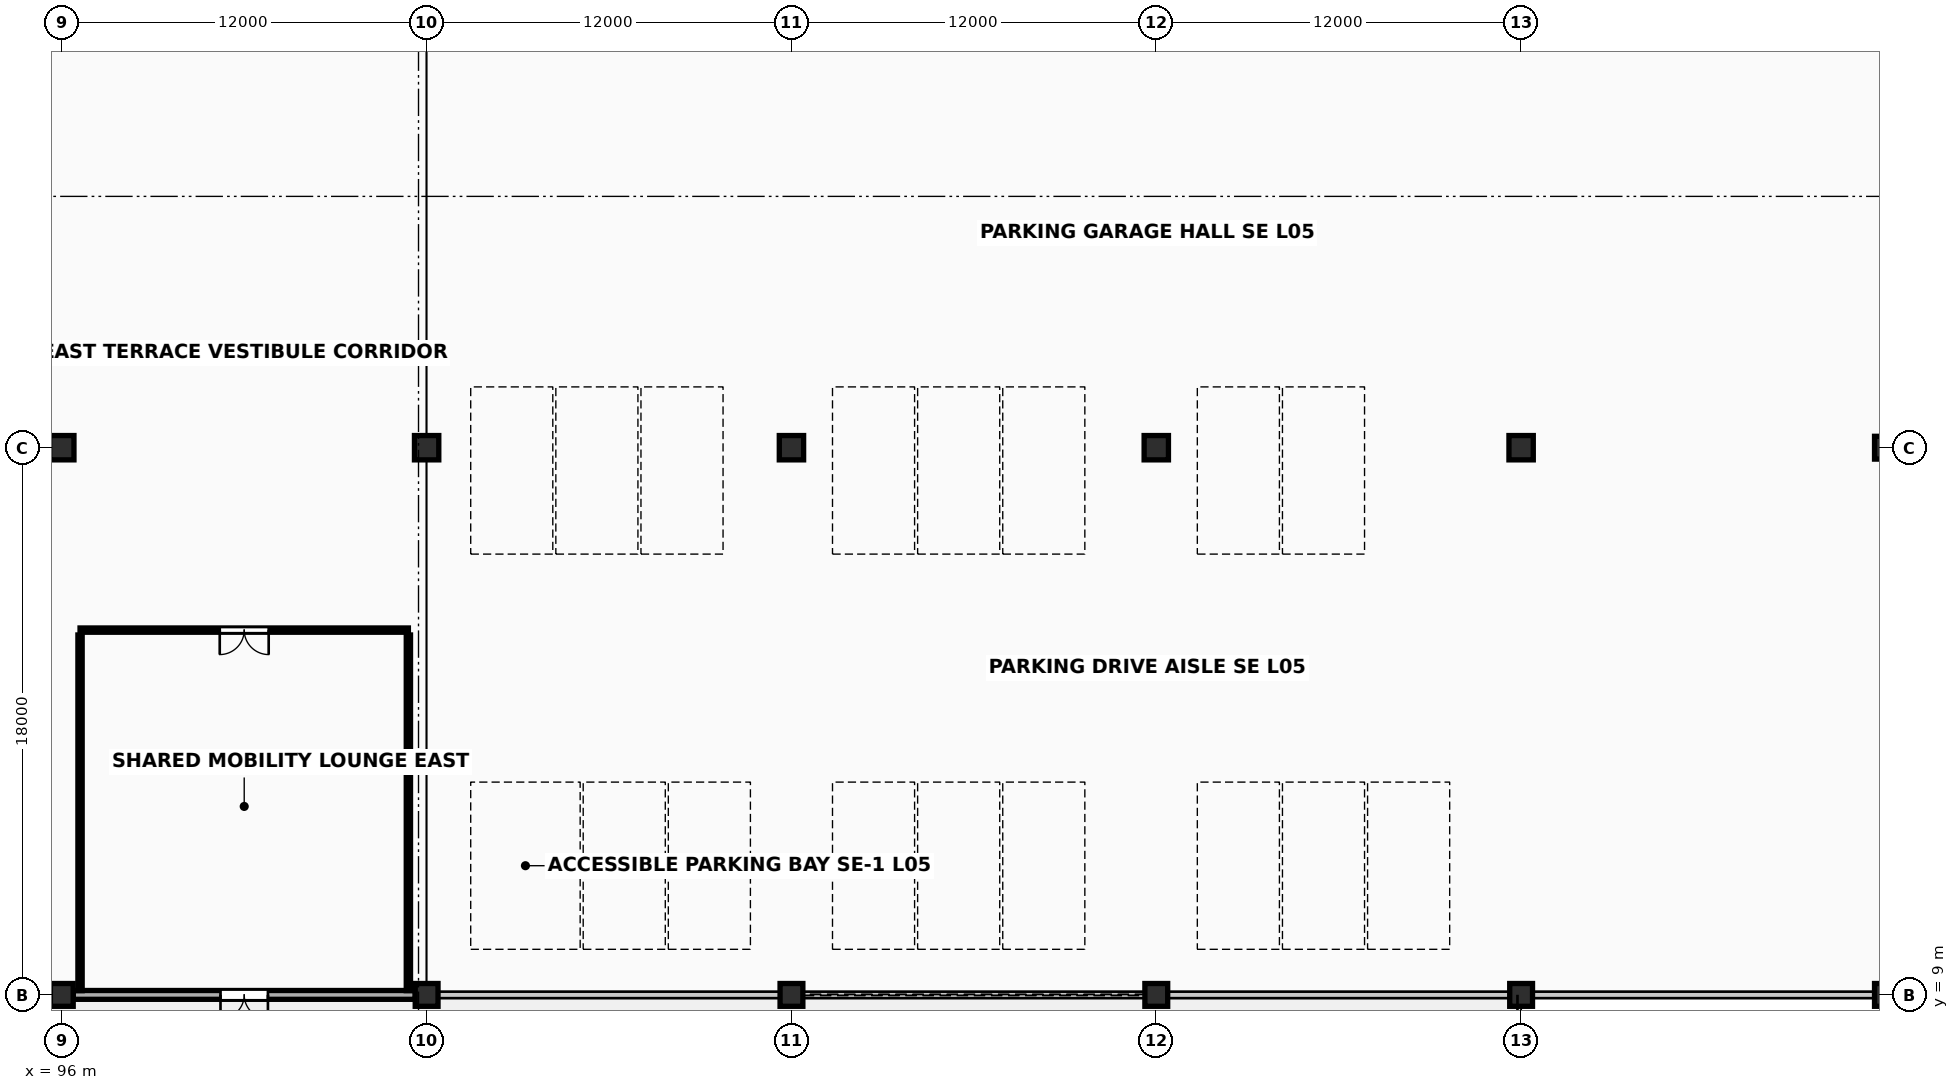
"""IFC4 building model, lengths in metres.
Left out: names, types, materials, properties, quantities, classifications, styles, units other than length and angle.
Written with IfcOpenShell. Run it as: python <this file> out.ifc"""

import sys

from ifc_helpers import new_model, si_unit, direction, frame, frame_2d, origin, origin_2d, place, context, subcontext, project, spatial, rectangle, extrude, element, fill, save


model = new_model("IFC4")
c1 = context("Model", 3, precision=1e-05, world=origin(), true_north=direction((0.0, 1.0)))
c2 = subcontext(c1, "Body", "Model", "MODEL_VIEW")
j1 = project(units=[si_unit("LENGTHUNIT", "METRE"), si_unit("PLANEANGLEUNIT", "RADIAN")], contexts=[c1])
p1 = place(None, origin())
s1 = spatial("IfcSite", under=j1, at=p1, CompositionType="ELEMENT")
p2 = place(p1, origin())
s2 = spatial("IfcBuilding", under=s1, at=p2, CompositionType="ELEMENT")
p3 = place(p2, frame((0.0, 0.0, 21.0)))
s3 = spatial("IfcBuildingStorey", under=s2, at=p3, CompositionType="ELEMENT", Elevation=21.0)
p4 = place(p3, frame((96.0, 9.0, 0.0), z_axis=(0.0, 0.0, 1.0), x_axis=(1.0, 0.0, 0.0)))
e1 = element("IfcColumn", 1, at=p4, inside=s3, PredefinedType="COLUMN", context=c2, shape_type="SweptSolid", body=[
    extrude(rectangle(XDim=0.75, YDim=0.75, at=origin_2d()), origin(), (0.0, 0.0, 1.0), 3.8),
])
p5 = place(p3, frame((96.0, 27.0, 0.0), z_axis=(0.0, 0.0, 1.0), x_axis=(1.0, 0.0, 0.0)))
e2 = element("IfcColumn", 2, at=p5, inside=s3, PredefinedType="COLUMN", context=c2, shape_type="SweptSolid", body=[
    extrude(rectangle(XDim=0.8, YDim=0.8, at=origin_2d()), origin(), (0.0, 0.0, 1.0), 3.8),
])
p6 = place(p3, frame((108.0, 9.0, 0.0), z_axis=(0.0, 0.0, 1.0), x_axis=(1.0, 0.0, 0.0)))
e3 = element("IfcColumn", 3, at=p6, inside=s3, PredefinedType="COLUMN", context=c2, shape_type="SweptSolid", body=[
    extrude(rectangle(XDim=0.75, YDim=0.75, at=origin_2d()), origin(), (0.0, 0.0, 1.0), 3.8),
])
p7 = place(p3, frame((108.0, 27.0, 0.0), z_axis=(0.0, 0.0, 1.0), x_axis=(1.0, 0.0, 0.0)))
e4 = element("IfcColumn", 4, at=p7, inside=s3, PredefinedType="COLUMN", context=c2, shape_type="SweptSolid", body=[
    extrude(rectangle(XDim=0.8, YDim=0.8, at=origin_2d()), origin(), (0.0, 0.0, 1.0), 3.8),
])
p8 = place(p3, frame((120.0, 9.0, 0.0), z_axis=(0.0, 0.0, 1.0), x_axis=(1.0, 0.0, 0.0)))
e5 = element("IfcColumn", 5, at=p8, inside=s3, PredefinedType="COLUMN", context=c2, shape_type="SweptSolid", body=[
    extrude(rectangle(XDim=0.75, YDim=0.75, at=origin_2d()), origin(), (0.0, 0.0, 1.0), 3.8),
])
p9 = place(p3, frame((120.0, 27.0, 0.0), z_axis=(0.0, 0.0, 1.0), x_axis=(1.0, 0.0, 0.0)))
e6 = element("IfcColumn", 6, at=p9, inside=s3, PredefinedType="COLUMN", context=c2, shape_type="SweptSolid", body=[
    extrude(rectangle(XDim=0.8, YDim=0.8, at=origin_2d()), origin(), (0.0, 0.0, 1.0), 3.8),
])
p10 = place(p3, frame((132.0, 9.0, 0.0), z_axis=(0.0, 0.0, 1.0), x_axis=(1.0, 0.0, 0.0)))
e7 = element("IfcColumn", 7, at=p10, inside=s3, PredefinedType="COLUMN", context=c2, shape_type="SweptSolid", body=[
    extrude(rectangle(XDim=0.75, YDim=0.75, at=origin_2d()), origin(), (0.0, 0.0, 1.0), 3.8),
])
p11 = place(p3, frame((132.0, 27.0, 0.0), z_axis=(0.0, 0.0, 1.0), x_axis=(1.0, 0.0, 0.0)))
e8 = element("IfcColumn", 8, at=p11, inside=s3, PredefinedType="COLUMN", context=c2, shape_type="SweptSolid", body=[
    extrude(rectangle(XDim=0.8, YDim=0.8, at=origin_2d()), origin(), (0.0, 0.0, 1.0), 3.8),
])
p12 = place(p3, frame((144.0, 9.0, 0.0), z_axis=(0.0, 0.0, 1.0), x_axis=(1.0, 0.0, 0.0)))
e9 = element("IfcColumn", 9, at=p12, inside=s3, PredefinedType="COLUMN", context=c2, shape_type="SweptSolid", body=[
    extrude(rectangle(XDim=0.75, YDim=0.75, at=origin_2d()), origin(), (0.0, 0.0, 1.0), 3.8),
])
p13 = place(p3, frame((144.0, 27.0, 0.0), z_axis=(0.0, 0.0, 1.0), x_axis=(1.0, 0.0, 0.0)))
e10 = element("IfcColumn", 10, at=p13, inside=s3, PredefinedType="COLUMN", context=c2, shape_type="SweptSolid", body=[
    extrude(rectangle(XDim=0.8, YDim=0.8, at=origin_2d()), origin(), (0.0, 0.0, 1.0), 3.8),
])
for number, where, z_axis, x_axis in (
    (11, (156.0, 9.0, 0.0), (0.0, 0.0, 1.0), (1.0, 0.0, 0.0)),
    (12, (156.0, 27.0, 0.0), (0.0, 0.0, 1.0), (1.0, 0.0, 0.0)),
):
    element("IfcColumn", number, at=place(p3, frame(where, z_axis=z_axis, x_axis=x_axis)), inside=s3, PredefinedType="COLUMN", context=c2, shape_type="SweptSolid", body=[
        extrude(rectangle(XDim=0.75, YDim=0.75, at=origin_2d()), origin(), (0.0, 0.0, 1.0), 3.8),
    ])
p14 = place(p3, frame((96.373, 9.0, 0.0), z_axis=(0.0, 0.0, 1.0), x_axis=(1.0, 0.0, 0.0)))
e13 = element("IfcWall", 13, at=p14, inside=s3, PredefinedType="SOLIDWALL", context=c2, shape_type="SweptSolid", body=[
    extrude(rectangle(XDim=11.254, YDim=0.29, at=frame_2d((5.627, 0.0))), origin(), (0.0, 0.0, 1.0), 2.385),
])
p15 = place(p14, frame((4.847, 0.0, 0.0)))
e14 = element("IfcOpeningElement", 14, at=p15, cuts=e13, PredefinedType="OPENING", context=c2, shape_type="SweptSolid", body=[
    extrude(rectangle(XDim=1.56, YDim=2.3, at=frame_2d((0.78, 1.15))), frame((0.0, 0.16, 0.0), z_axis=(0.0, -1.0, 0.0), x_axis=(1.0, 0.0, 0.0)), (0.0, 0.0, 1.0), 0.32),
])
for number, where, z_axis, x_axis in (
    (15, (108.373, 9.0, 0.0), (0.0, 0.0, 1.0), (1.0, 0.0, 0.0)),
    (16, (120.373, 9.0, 0.0), (0.0, 0.0, 1.0), (1.0, 0.0, 0.0)),
    (17, (132.373, 9.0, 0.0), (0.0, 0.0, 1.0), (1.0, 0.0, 0.0)),
    (18, (144.373, 9.0, 0.0), (0.0, 0.0, 1.0), (1.0, 0.0, 0.0)),
):
    element("IfcWall", number, at=place(p3, frame(where, z_axis=z_axis, x_axis=x_axis)), inside=s3, PredefinedType="PARAPET", context=c2, shape_type="SweptSolid", body=[
        extrude(rectangle(XDim=11.254, YDim=0.215, at=frame_2d((5.627, 0.0))), origin(), (0.0, 0.0, 1.0), 1.15),
    ])
p16 = place(p3, frame((96.6, 21.0, 0.0), z_axis=(0.0, 0.0, 1.0), x_axis=(1.0, 0.0, 0.0)))
e19 = element("IfcWall", 19, at=p16, inside=s3, PredefinedType="PARTITIONING", context=c2, shape_type="SweptSolid", body=[
    extrude(rectangle(XDim=10.8, YDim=0.14, at=frame_2d((5.4, 0.0))), origin(), (0.0, 0.0, 1.0), 2.75),
])
p17 = place(p16, frame((4.595, 0.0, 0.0)))
e20 = element("IfcOpeningElement", 20, at=p17, cuts=e19, PredefinedType="OPENING", context=c2, shape_type="SweptSolid", body=[
    extrude(rectangle(XDim=1.61, YDim=2.33, at=frame_2d((0.805, 1.165))), frame((0.0, 0.085, 0.0), z_axis=(0.0, -1.0, 0.0), x_axis=(1.0, 0.0, 0.0)), (0.0, 0.0, 1.0), 0.17),
])
for number, where, z_axis, x_axis in (
    (21, (96.6, 9.14, 0.0), (0.0, 0.0, 1.0), (0.0, 1.0, 0.0)),
    (22, (107.4, 9.14, 0.0), (0.0, 0.0, 1.0), (0.0, 1.0, 0.0)),
):
    element("IfcWall", number, at=place(p3, frame(where, z_axis=z_axis, x_axis=x_axis)), inside=s3, PredefinedType="PARTITIONING", context=c2, shape_type="SweptSolid", body=[
        extrude(rectangle(XDim=11.7, YDim=0.14, at=frame_2d((5.85, 0.0))), origin(), (0.0, 0.0, 1.0), 2.75),
    ])
p18 = place(p15, origin())
e23 = element("IfcDoor", 23, at=p18, inside=s3, OperationType="DOUBLE_DOOR_SINGLE_SWING", PredefinedType="DOOR", context=c2, shape_type="SweptSolid", body=[
    extrude(rectangle(XDim=1.56, YDim=2.3, at=frame_2d((0.78, 1.15))), frame((0.0, 0.025, 0.0), z_axis=(0.0, -1.0, 0.0), x_axis=(1.0, 0.0, 0.0)), (0.0, 0.0, 1.0), 0.05),
])
fill(e14, e23)
p19 = place(p17, origin())
e24 = element("IfcDoor", 24, at=p19, inside=s3, OperationType="DOUBLE_DOOR_SINGLE_SWING", PredefinedType="DOOR", context=c2, shape_type="SweptSolid", body=[
    extrude(rectangle(XDim=1.61, YDim=2.33, at=frame_2d((0.805, 1.165))), frame((0.0, 0.025, 0.0), z_axis=(0.0, -1.0, 0.0), x_axis=(1.0, 0.0, 0.0)), (0.0, 0.0, 1.0), 0.05),
])
fill(e20, e24)
save(model, sys.argv[1])
